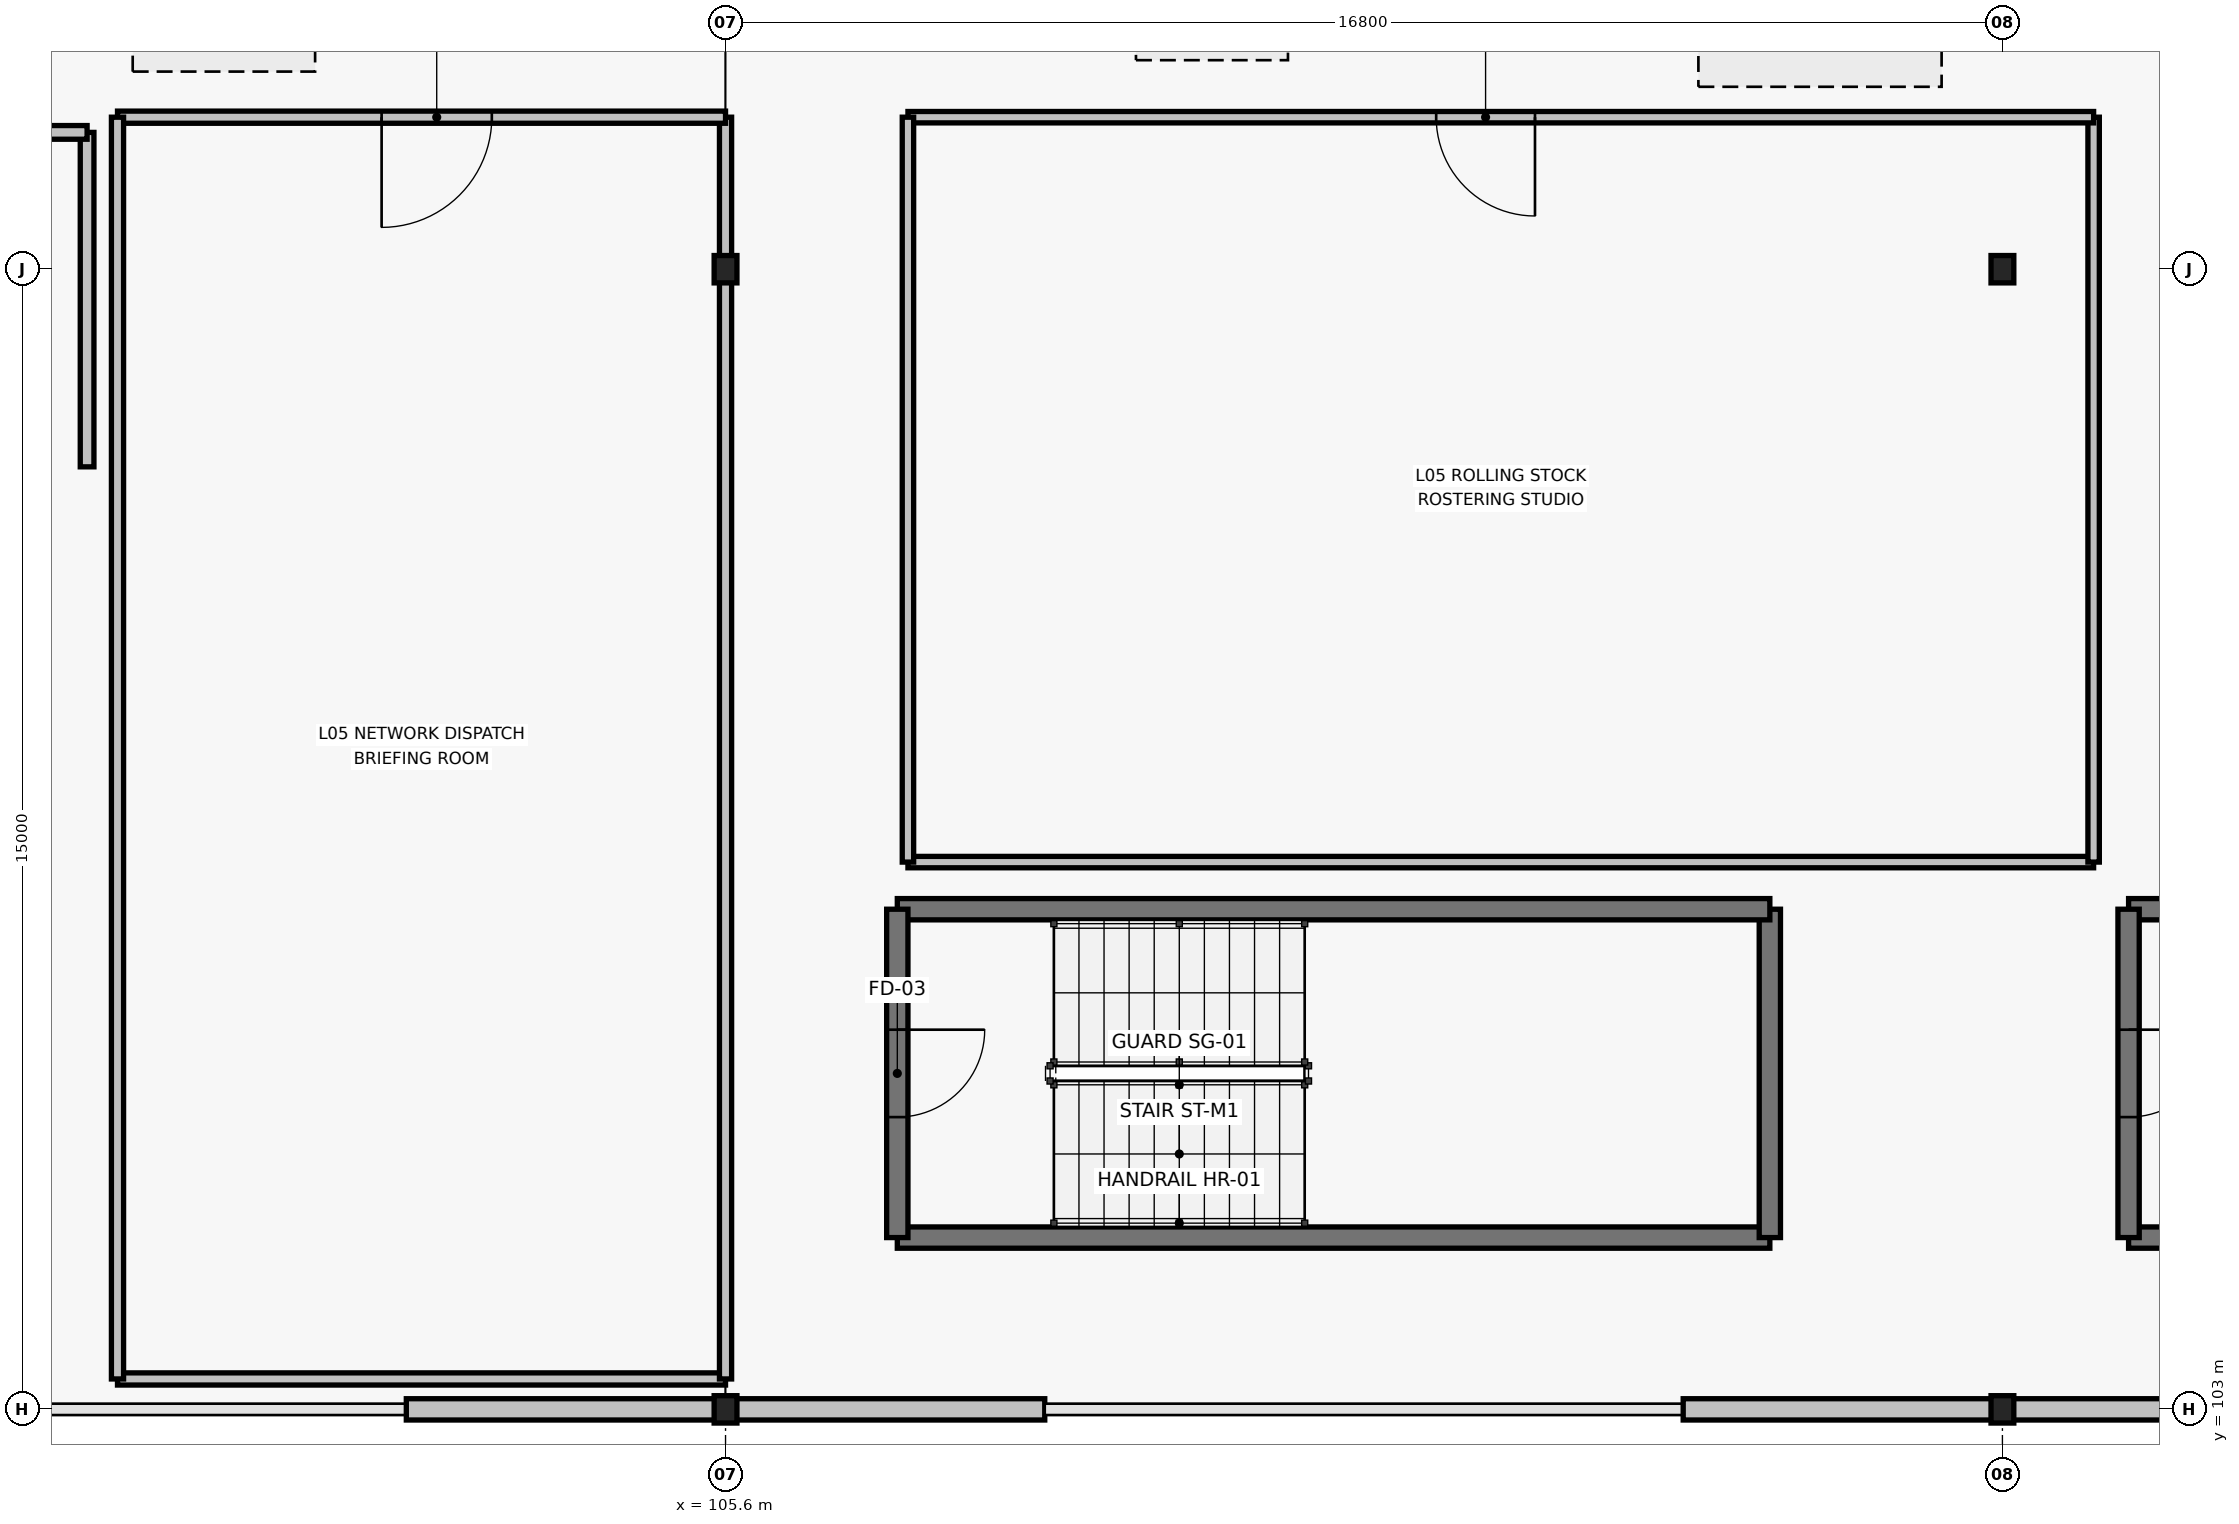
"""IFC4 building model, lengths in metres.
Left out: names, types, materials, properties, quantities, classifications, styles, units other than length and angle.
Written with IfcOpenShell. Run it as: python <this file> out.ifc"""

import sys

from ifc_helpers import new_model, si_unit, direction, frame, frame_2d, origin, origin_2d, place, context, subcontext, project, spatial, rectangle, i_section, extrude, element, fill, save


model = new_model("IFC4")
c1 = context("Model", 3, precision=1e-05, world=origin(), true_north=direction((0.0, 1.0)))
c2 = subcontext(c1, "Body", "Model", "MODEL_VIEW")
j1 = project(units=[si_unit("LENGTHUNIT", "METRE"), si_unit("PLANEANGLEUNIT", "RADIAN")], contexts=[c1])
p1 = place(None, origin())
s1 = spatial("IfcSite", under=j1, at=p1, CompositionType="ELEMENT")
p2 = place(p1, origin())
s2 = spatial("IfcBuilding", under=s1, at=p2, CompositionType="ELEMENT")
p3 = place(p2, frame((0.0, 0.0, 24.9)))
s3 = spatial("IfcBuildingStorey", under=s2, at=p3, CompositionType="ELEMENT", Elevation=24.9)
for number, where, z_axis, x_axis in (
    (1, (105.6, 103.0, 0.0), (0.0, 0.0, 1.0), (1.0, 0.0, 0.0)),
    (2, (105.6, 118.0, 0.0), (0.0, 0.0, 1.0), (1.0, 0.0, 0.0)),
    (3, (122.4, 103.0, 0.0), (0.0, 0.0, 1.0), (1.0, 0.0, 0.0)),
    (4, (122.4, 118.0, 0.0), (0.0, 0.0, 1.0), (1.0, 0.0, 0.0)),
):
    element("IfcColumn", number, at=place(p3, frame(where, z_axis=z_axis, x_axis=x_axis)), inside=s3, PredefinedType="COLUMN", context=c2, shape_type="SweptSolid", body=[
        extrude(i_section(OverallWidth=0.3, OverallDepth=0.36, WebThickness=0.012, FlangeThickness=0.022, FilletRadius=0.027, at=origin_2d()), origin(), (0.0, 0.0, 1.0), 3.9),
    ])
p4 = place(p3, frame((101.4, 103.0, 0.0), z_axis=(0.0, 0.0, 1.0), x_axis=(1.0, 0.0, 0.0)))
e5 = element("IfcWall", 5, at=p4, inside=s3, PredefinedType="STANDARD", context=c2, shape_type="SweptSolid", body=[
    extrude(rectangle(XDim=4.2, YDim=0.28, at=frame_2d((2.1, 0.0))), origin(), (0.0, 0.0, 1.0), 3.3),
])
for number, where, z_axis, x_axis in (
    (6, (105.6, 103.0, 0.0), (0.0, 0.0, 1.0), (1.0, 0.0, 0.0)),
    (7, (118.2, 103.0, 0.0), (0.0, 0.0, 1.0), (1.0, 0.0, 0.0)),
):
    element("IfcWall", number, at=place(p3, frame(where, z_axis=z_axis, x_axis=x_axis)), inside=s3, PredefinedType="STANDARD", context=c2, shape_type="SweptSolid", body=[
        extrude(rectangle(XDim=4.2, YDim=0.28, at=frame_2d((2.1, 0.0))), origin(), (0.0, 0.0, 1.0), 3.3),
    ])
p5 = place(p3, frame((122.4, 103.0, 0.0), z_axis=(0.0, 0.0, 1.0), x_axis=(1.0, 0.0, 0.0)))
e8 = element("IfcWall", 8, at=p5, inside=s3, PredefinedType="STANDARD", context=c2, shape_type="SweptSolid", body=[
    extrude(rectangle(XDim=4.2, YDim=0.28, at=frame_2d((2.1, 0.0))), origin(), (0.0, 0.0, 1.0), 3.3),
])
p6 = place(p3, frame((107.86, 105.26, 0.0), z_axis=(0.0, 0.0, 1.0), x_axis=(1.0, 0.0, 0.0)))
e9 = element("IfcWall", 9, at=p6, inside=s3, PredefinedType="SHEAR", context=c2, shape_type="SweptSolid", body=[
    extrude(rectangle(XDim=11.48, YDim=0.28, at=frame_2d((5.74, 0.0))), origin(), (0.0, 0.0, 1.0), 3.695),
])
p7 = place(p3, frame((119.34, 105.26, 0.0), z_axis=(0.0, 0.0, 1.0), x_axis=(0.0, 1.0, 0.0)))
e10 = element("IfcWall", 10, at=p7, inside=s3, PredefinedType="SHEAR", context=c2, shape_type="SweptSolid", body=[
    extrude(rectangle(XDim=4.32, YDim=0.28, at=frame_2d((2.16, 0.0))), origin(), (0.0, 0.0, 1.0), 3.695),
])
p8 = place(p3, frame((119.34, 109.58, 0.0), z_axis=(0.0, 0.0, 1.0), x_axis=(-1.0, 0.0, 0.0)))
e11 = element("IfcWall", 11, at=p8, inside=s3, PredefinedType="SHEAR", context=c2, shape_type="SweptSolid", body=[
    extrude(rectangle(XDim=11.48, YDim=0.28, at=frame_2d((5.74, 0.0))), origin(), (0.0, 0.0, 1.0), 3.695),
])
p9 = place(p3, frame((107.86, 109.58, 0.0), z_axis=(0.0, 0.0, 1.0), x_axis=(0.0, -1.0, 0.0)))
e12 = element("IfcWall", 12, at=p9, inside=s3, PredefinedType="SHEAR", context=c2, shape_type="SweptSolid", body=[
    extrude(rectangle(XDim=4.32, YDim=0.28, at=frame_2d((2.16, 0.0))), origin(), (0.0, 0.0, 1.0), 3.695),
])
p10 = place(p9, frame((1.585, 0.0, 0.0)))
e13 = element("IfcOpeningElement", 13, at=p10, cuts=e12, PredefinedType="OPENING", context=c2, shape_type="SweptSolid", body=[
    extrude(rectangle(XDim=1.15, YDim=2.2, at=frame_2d((0.575, 1.1))), frame((0.0, 0.15, 0.0), z_axis=(0.0, -1.0, 0.0), x_axis=(1.0, 0.0, 0.0)), (0.0, 0.0, 1.0), 0.3),
])
for number, where, z_axis, x_axis in (
    (14, (124.06, 105.26, 0.0), (0.0, 0.0, 1.0), (1.0, 0.0, 0.0)),
    (15, (135.54, 109.58, 0.0), (0.0, 0.0, 1.0), (-1.0, 0.0, 0.0)),
):
    element("IfcWall", number, at=place(p3, frame(where, z_axis=z_axis, x_axis=x_axis)), inside=s3, PredefinedType="SHEAR", context=c2, shape_type="SweptSolid", body=[
        extrude(rectangle(XDim=11.48, YDim=0.28, at=frame_2d((5.74, 0.0))), origin(), (0.0, 0.0, 1.0), 3.695),
    ])
p11 = place(p3, frame((124.06, 109.58, 0.0), z_axis=(0.0, 0.0, 1.0), x_axis=(0.0, -1.0, 0.0)))
e16 = element("IfcWall", 16, at=p11, inside=s3, PredefinedType="SHEAR", context=c2, shape_type="SweptSolid", body=[
    extrude(rectangle(XDim=4.32, YDim=0.28, at=frame_2d((2.16, 0.0))), origin(), (0.0, 0.0, 1.0), 3.695),
])
p12 = place(p11, frame((1.585, 0.0, 0.0)))
e17 = element("IfcOpeningElement", 17, at=p12, cuts=e16, PredefinedType="OPENING", context=c2, shape_type="SweptSolid", body=[
    extrude(rectangle(XDim=1.15, YDim=2.2, at=frame_2d((0.575, 1.1))), frame((0.0, 0.15, 0.0), z_axis=(0.0, -1.0, 0.0), x_axis=(1.0, 0.0, 0.0)), (0.0, 0.0, 1.0), 0.3),
])
p13 = place(p3, frame((97.2, 115.4, 0.0), z_axis=(0.0, 0.0, 1.0), x_axis=(0.0, 1.0, 0.0)))
e18 = element("IfcWall", 18, at=p13, inside=s3, PredefinedType="PARTITIONING", context=c2, shape_type="SweptSolid", body=[
    extrude(rectangle(XDim=4.4, YDim=0.18, at=frame_2d((2.2, 0.0))), origin(), (0.0, 0.0, 1.0), 3.695),
])
p14 = place(p3, frame((97.2, 119.8, 0.0), z_axis=(0.0, 0.0, 1.0), x_axis=(-1.0, 0.0, 0.0)))
e19 = element("IfcWall", 19, at=p14, inside=s3, PredefinedType="PARTITIONING", context=c2, shape_type="SweptSolid", body=[
    extrude(rectangle(XDim=7.0, YDim=0.18, at=frame_2d((3.5, 0.0))), origin(), (0.0, 0.0, 1.0), 3.695),
])
p15 = place(p14, frame((4.075, 0.0, 0.0), z_axis=(0.0, 0.0, 1.0), x_axis=(-1.0, 0.0, 0.0)))
e20 = element("IfcOpeningElement", 20, at=p15, cuts=e19, PredefinedType="OPENING", context=c2, shape_type="SweptSolid", body=[
    extrude(rectangle(XDim=1.15, YDim=2.2, at=frame_2d((0.575, 1.1))), frame((0.0, 0.1, 0.0), z_axis=(0.0, -1.0, 0.0), x_axis=(1.0, 0.0, 0.0)), (0.0, 0.0, 1.0), 0.2),
])
p16 = place(p3, frame((97.6, 103.4, 0.0), z_axis=(0.0, 0.0, 1.0), x_axis=(1.0, 0.0, 0.0)))
e21 = element("IfcWall", 21, at=p16, inside=s3, PredefinedType="PARTITIONING", context=c2, shape_type="SweptSolid", body=[
    extrude(rectangle(XDim=8.0, YDim=0.16, at=frame_2d((4.0, 0.0))), origin(), (0.0, 0.0, 1.0), 3.3),
])
p17 = place(p3, frame((105.6, 103.4, 0.0), z_axis=(0.0, 0.0, 1.0), x_axis=(0.0, 1.0, 0.0)))
e22 = element("IfcWall", 22, at=p17, inside=s3, PredefinedType="PARTITIONING", context=c2, shape_type="SweptSolid", body=[
    extrude(rectangle(XDim=16.6, YDim=0.16, at=frame_2d((8.3, 0.0))), origin(), (0.0, 0.0, 1.0), 3.19),
])
p18 = place(p3, frame((105.6, 120.0, 0.0), z_axis=(0.0, 0.0, 1.0), x_axis=(-1.0, 0.0, 0.0)))
e23 = element("IfcWall", 23, at=p18, inside=s3, PredefinedType="PARTITIONING", context=c2, shape_type="SweptSolid", body=[
    extrude(rectangle(XDim=8.0, YDim=0.16, at=frame_2d((4.0, 0.0))), origin(), (0.0, 0.0, 1.0), 3.695),
])
p19 = place(p18, frame((4.525, 0.0, 0.0), z_axis=(0.0, 0.0, 1.0), x_axis=(-1.0, 0.0, 0.0)))
e24 = element("IfcOpeningElement", 24, at=p19, cuts=e23, PredefinedType="OPENING", context=c2, shape_type="SweptSolid", body=[
    extrude(rectangle(XDim=1.45, YDim=2.25, at=frame_2d((0.725, 1.125))), frame((0.0, 0.09, 0.0), z_axis=(0.0, -1.0, 0.0), x_axis=(1.0, 0.0, 0.0)), (0.0, 0.0, 1.0), 0.18),
])
p20 = place(p3, frame((97.6, 120.0, 0.0), z_axis=(0.0, 0.0, 1.0), x_axis=(0.0, -1.0, 0.0)))
e25 = element("IfcWall", 25, at=p20, inside=s3, PredefinedType="PARTITIONING", context=c2, shape_type="SweptSolid", body=[
    extrude(rectangle(XDim=16.6, YDim=0.16, at=frame_2d((8.3, 0.0))), origin(), (0.0, 0.0, 1.0), 3.695),
])
p21 = place(p3, frame((108.0, 110.2, 0.0), z_axis=(0.0, 0.0, 1.0), x_axis=(1.0, 0.0, 0.0)))
e26 = element("IfcWall", 26, at=p21, inside=s3, PredefinedType="PARTITIONING", context=c2, shape_type="SweptSolid", body=[
    extrude(rectangle(XDim=15.6, YDim=0.15, at=frame_2d((7.8, 0.0))), origin(), (0.0, 0.0, 1.0), 3.695),
])
p22 = place(p3, frame((123.6, 110.2, 0.0), z_axis=(0.0, 0.0, 1.0), x_axis=(0.0, 1.0, 0.0)))
e27 = element("IfcWall", 27, at=p22, inside=s3, PredefinedType="PARTITIONING", context=c2, shape_type="SweptSolid", body=[
    extrude(rectangle(XDim=9.8, YDim=0.15, at=frame_2d((4.9, 0.0))), origin(), (0.0, 0.0, 1.0), 3.695),
])
p23 = place(p3, frame((123.6, 120.0, 0.0), z_axis=(0.0, 0.0, 1.0), x_axis=(-1.0, 0.0, 0.0)))
e28 = element("IfcWall", 28, at=p23, inside=s3, PredefinedType="PARTITIONING", context=c2, shape_type="SweptSolid", body=[
    extrude(rectangle(XDim=15.6, YDim=0.15, at=frame_2d((7.8, 0.0))), origin(), (0.0, 0.0, 1.0), 3.695),
])
p24 = place(p23, frame((7.35, 0.0, 0.0)))
e29 = element("IfcOpeningElement", 29, at=p24, cuts=e28, PredefinedType="OPENING", context=c2, shape_type="SweptSolid", body=[
    extrude(rectangle(XDim=1.3, YDim=2.15, at=frame_2d((0.65, 1.075))), frame((0.0, 0.085, 0.0), z_axis=(0.0, -1.0, 0.0), x_axis=(1.0, 0.0, 0.0)), (0.0, 0.0, 1.0), 0.17),
])
p25 = place(p3, frame((108.0, 120.0, 0.0), z_axis=(0.0, 0.0, 1.0), x_axis=(0.0, -1.0, 0.0)))
e30 = element("IfcWall", 30, at=p25, inside=s3, PredefinedType="PARTITIONING", context=c2, shape_type="SweptSolid", body=[
    extrude(rectangle(XDim=9.8, YDim=0.15, at=frame_2d((4.9, 0.0))), origin(), (0.0, 0.0, 1.0), 3.695),
])
p26 = place(p2, frame((0.0, 0.0, 28.8)))
p27 = place(p26, frame((0.0, 0.0, -0.205)))
p28 = place(p27, frame((99.0, 121.5, 0.0)))
p29 = place(p28, frame((0.0, 0.0, 0.155)))
e31 = element("IfcWindow", 31, at=p29, inside=s3, PartitioningType="SINGLE_PANEL", PredefinedType="SKYLIGHT", context=c2, shape_type="SweptSolid", body=[
    extrude(rectangle(XDim=2.4, YDim=1.8, at=origin_2d()), origin(), (0.0, 0.0, 1.0), 0.05),
])
p30 = place(p26, frame((0.0, 0.0, -0.205)))
p31 = place(p30, frame((112.0, 121.5, 0.0)))
p32 = place(p31, frame((0.0, 0.0, 0.155)))
e32 = element("IfcWindow", 32, at=p32, inside=s3, PartitioningType="SINGLE_PANEL", PredefinedType="SKYLIGHT", context=c2, shape_type="SweptSolid", body=[
    extrude(rectangle(XDim=2.0, YDim=1.5, at=origin_2d()), origin(), (0.0, 0.0, 1.0), 0.05),
])
p33 = place(p30, frame((120.0, 121.5, 0.0)))
p34 = place(p33, frame((0.0, 0.0, 0.155)))
e33 = element("IfcWindow", 33, at=p34, inside=s3, PartitioningType="SINGLE_PANEL", PredefinedType="SKYLIGHT", context=c2, shape_type="SweptSolid", body=[
    extrude(rectangle(XDim=3.2, YDim=2.2, at=origin_2d()), origin(), (0.0, 0.0, 1.0), 0.05),
])
p35 = place(p10, origin())
e34 = element("IfcDoor", 34, at=p35, inside=s3, OperationType="SINGLE_SWING_LEFT", PredefinedType="DOOR", context=c2, shape_type="SweptSolid", body=[
    extrude(rectangle(XDim=1.15, YDim=2.2, at=frame_2d((0.575, 1.1))), frame((0.0, 0.025, 0.0), z_axis=(0.0, -1.0, 0.0), x_axis=(1.0, 0.0, 0.0)), (0.0, 0.0, 1.0), 0.05),
])
fill(e13, e34)
p36 = place(p12, origin())
e35 = element("IfcDoor", 35, at=p36, inside=s3, OperationType="SINGLE_SWING_LEFT", PredefinedType="DOOR", context=c2, shape_type="SweptSolid", body=[
    extrude(rectangle(XDim=1.15, YDim=2.2, at=frame_2d((0.575, 1.1))), frame((0.0, 0.025, 0.0), z_axis=(0.0, -1.0, 0.0), x_axis=(1.0, 0.0, 0.0)), (0.0, 0.0, 1.0), 0.05),
])
fill(e17, e35)
p37 = place(p19, origin())
e36 = element("IfcDoor", 36, at=p37, inside=s3, OperationType="SINGLE_SWING_RIGHT", PredefinedType="DOOR", context=c2, shape_type="SweptSolid", body=[
    extrude(rectangle(XDim=1.45, YDim=2.25, at=frame_2d((0.725, 1.125))), frame((0.0, 0.025, 0.0), z_axis=(0.0, -1.0, 0.0), x_axis=(1.0, 0.0, 0.0)), (0.0, 0.0, 1.0), 0.05),
])
fill(e24, e36)
p38 = place(p24, origin())
e37 = element("IfcDoor", 37, at=p38, inside=s3, OperationType="SINGLE_SWING_LEFT", PredefinedType="DOOR", context=c2, shape_type="SweptSolid", body=[
    extrude(rectangle(XDim=1.3, YDim=2.15, at=frame_2d((0.65, 1.075))), frame((0.0, 0.025, 0.0), z_axis=(0.0, -1.0, 0.0), x_axis=(1.0, 0.0, 0.0)), (0.0, 0.0, 1.0), 0.05),
])
fill(e29, e37)
save(model, sys.argv[1])
